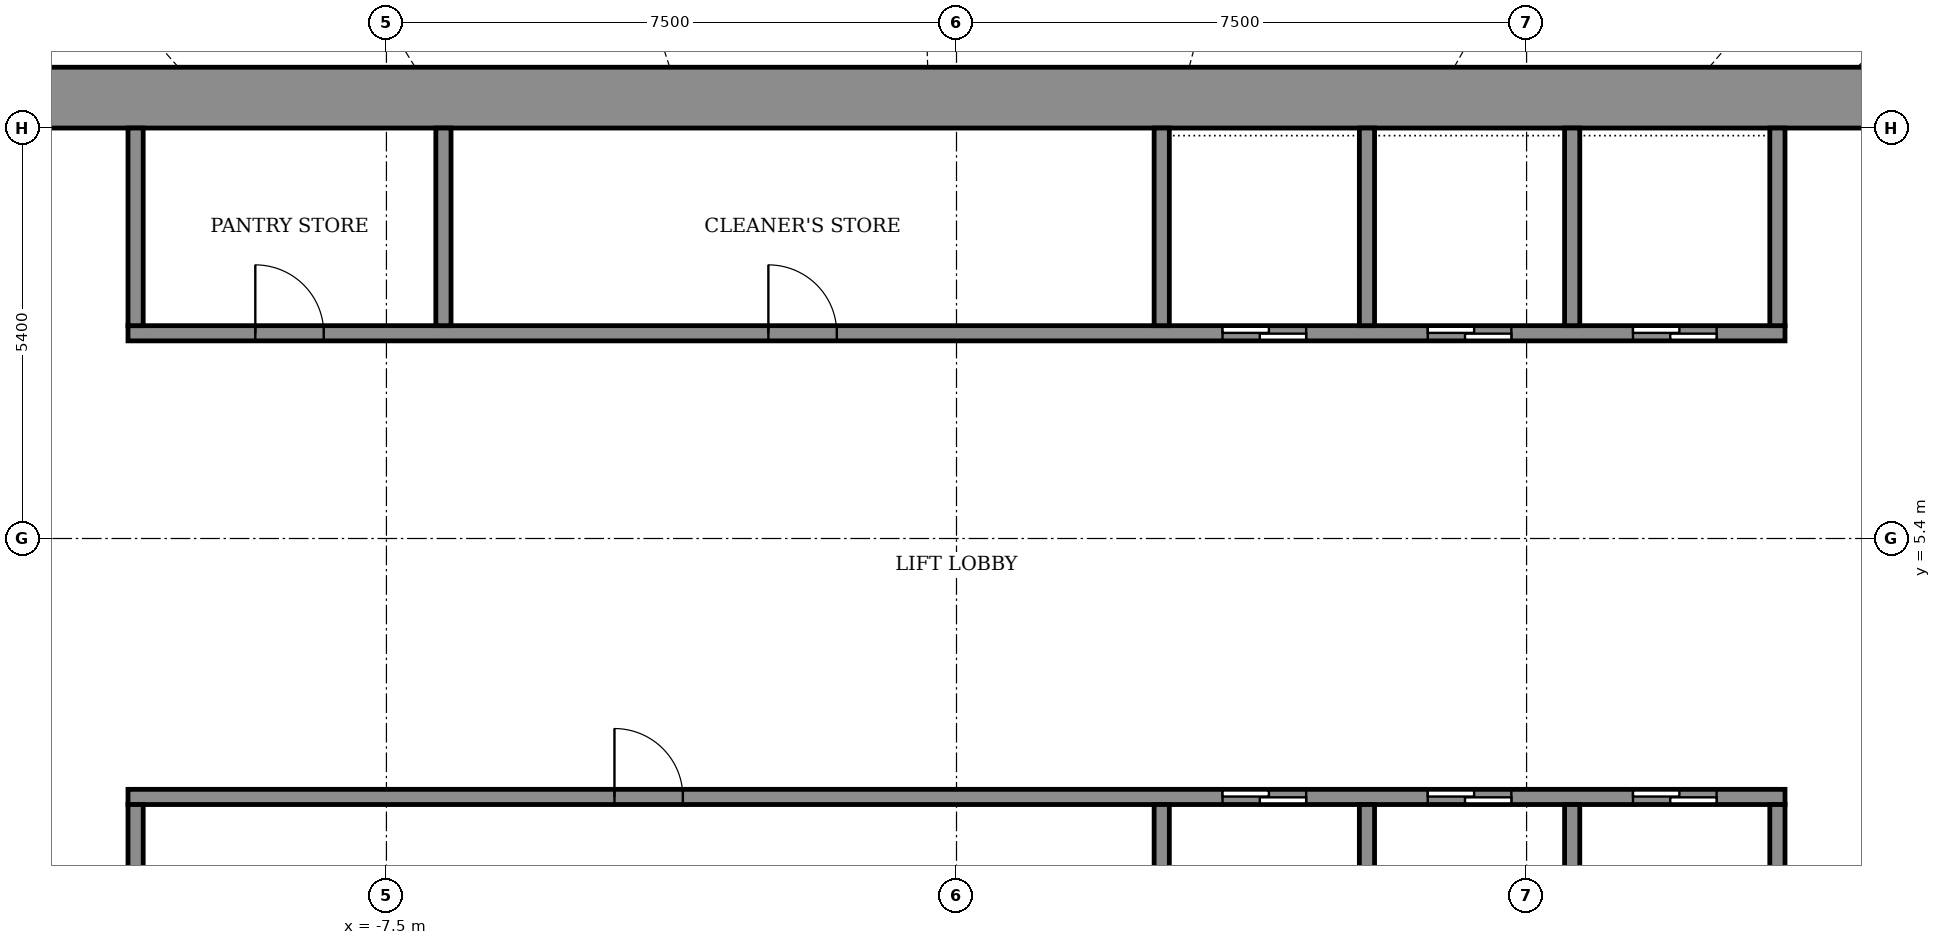
"""IFC4 building model, lengths in metres.
Left out: names, types, materials, properties, quantities, classifications, styles, units other than length and angle.
Written with IfcOpenShell. Run it as: python <this file> out.ifc"""

import sys

from ifc_helpers import new_model, si_unit, direction, frame, frame_2d, origin, place, context, subcontext, project, spatial, rectangle, extrude, element, fill, save


model = new_model("IFC4")
c1 = context("Model", 3, precision=1e-05, world=origin(), true_north=direction((0.0, 1.0)))
c2 = subcontext(c1, "Body", "Model", "MODEL_VIEW")
j1 = project(units=[si_unit("LENGTHUNIT", "METRE"), si_unit("PLANEANGLEUNIT", "RADIAN")], contexts=[c1])
p1 = place(None, origin())
s1 = spatial("IfcSite", under=j1, at=p1, CompositionType="ELEMENT")
p2 = place(p1, origin())
s2 = spatial("IfcBuilding", under=s1, at=p2, CompositionType="ELEMENT")
p3 = place(p2, frame((0.0, 0.0, 193.3)))
s3 = spatial("IfcBuildingStorey", under=s2, at=p3, CompositionType="ELEMENT", Elevation=193.3)
p4 = place(p3, frame((-14.6, 11.2, 0.0), z_axis=(0.0, 0.0, 1.0), x_axis=(1.0, 0.0, 0.0)))
e1 = element("IfcWall", 1, at=p4, inside=s3, PredefinedType="SHEAR", context=c2, shape_type="SweptSolid", body=[
    extrude(rectangle(XDim=29.2, YDim=0.8, at=frame_2d((14.6, 0.0))), origin(), (0.0, 0.0, 1.0), 4.6),
])
p5 = place(p3, frame((-10.9, 2.0, 0.0), z_axis=(0.0, 0.0, 1.0), x_axis=(1.0, 0.0, 0.0)))
e2 = element("IfcWall", 2, at=p5, inside=s3, PredefinedType="SHEAR", context=c2, shape_type="SweptSolid", body=[
    extrude(rectangle(XDim=21.8, YDim=0.2, at=frame_2d((10.9, 0.0))), origin(), (0.0, 0.0, 1.0), 4.05),
])
p6 = place(p5, frame((14.4, 0.0, 0.0)))
e3 = element("IfcOpeningElement", 3, at=p6, cuts=e2, PredefinedType="OPENING", context=c2, shape_type="SweptSolid", body=[
    extrude(rectangle(XDim=1.1, YDim=2.1, at=frame_2d((0.55, 1.05))), frame((0.0, 0.11, 0.0), z_axis=(0.0, -1.0, 0.0), x_axis=(1.0, 0.0, 0.0)), (0.0, 0.0, 1.0), 0.22),
])
p7 = place(p5, frame((17.1, 0.0, 0.0)))
e4 = element("IfcOpeningElement", 4, at=p7, cuts=e2, PredefinedType="OPENING", context=c2, shape_type="SweptSolid", body=[
    extrude(rectangle(XDim=1.1, YDim=2.1, at=frame_2d((0.55, 1.05))), frame((0.0, 0.11, 0.0), z_axis=(0.0, -1.0, 0.0), x_axis=(1.0, 0.0, 0.0)), (0.0, 0.0, 1.0), 0.22),
])
p8 = place(p5, frame((19.8, 0.0, 0.0)))
e5 = element("IfcOpeningElement", 5, at=p8, cuts=e2, PredefinedType="OPENING", context=c2, shape_type="SweptSolid", body=[
    extrude(rectangle(XDim=1.1, YDim=2.1, at=frame_2d((0.55, 1.05))), frame((0.0, 0.11, 0.0), z_axis=(0.0, -1.0, 0.0), x_axis=(1.0, 0.0, 0.0)), (0.0, 0.0, 1.0), 0.22),
])
p9 = place(p5, frame((6.4, 0.0, 0.0)))
e6 = element("IfcOpeningElement", 6, at=p9, cuts=e2, PredefinedType="OPENING", context=c2, shape_type="SweptSolid", body=[
    extrude(rectangle(XDim=0.9, YDim=2.1, at=frame_2d((0.45, 1.05))), frame((0.0, 0.11, 0.0), z_axis=(0.0, -1.0, 0.0), x_axis=(1.0, 0.0, 0.0)), (0.0, 0.0, 1.0), 0.22),
])
p10 = place(p3, frame((-10.9, 8.1, 0.0), z_axis=(0.0, 0.0, 1.0), x_axis=(1.0, 0.0, 0.0)))
e7 = element("IfcWall", 7, at=p10, inside=s3, PredefinedType="SHEAR", context=c2, shape_type="SweptSolid", body=[
    extrude(rectangle(XDim=21.8, YDim=0.2, at=frame_2d((10.9, 0.0))), origin(), (0.0, 0.0, 1.0), 4.05),
])
p11 = place(p10, frame((14.4, 0.0, 0.0)))
e8 = element("IfcOpeningElement", 8, at=p11, cuts=e7, PredefinedType="OPENING", context=c2, shape_type="SweptSolid", body=[
    extrude(rectangle(XDim=1.1, YDim=2.1, at=frame_2d((0.55, 1.05))), frame((0.0, 0.11, 0.0), z_axis=(0.0, -1.0, 0.0), x_axis=(1.0, 0.0, 0.0)), (0.0, 0.0, 1.0), 0.22),
])
p12 = place(p10, frame((17.1, 0.0, 0.0)))
e9 = element("IfcOpeningElement", 9, at=p12, cuts=e7, PredefinedType="OPENING", context=c2, shape_type="SweptSolid", body=[
    extrude(rectangle(XDim=1.1, YDim=2.1, at=frame_2d((0.55, 1.05))), frame((0.0, 0.11, 0.0), z_axis=(0.0, -1.0, 0.0), x_axis=(1.0, 0.0, 0.0)), (0.0, 0.0, 1.0), 0.22),
])
p13 = place(p10, frame((19.8, 0.0, 0.0)))
e10 = element("IfcOpeningElement", 10, at=p13, cuts=e7, PredefinedType="OPENING", context=c2, shape_type="SweptSolid", body=[
    extrude(rectangle(XDim=1.1, YDim=2.1, at=frame_2d((0.55, 1.05))), frame((0.0, 0.11, 0.0), z_axis=(0.0, -1.0, 0.0), x_axis=(1.0, 0.0, 0.0)), (0.0, 0.0, 1.0), 0.22),
])
p14 = place(p10, frame((1.675, 0.0, 0.0)))
e11 = element("IfcOpeningElement", 11, at=p14, cuts=e7, PredefinedType="OPENING", context=c2, shape_type="SweptSolid", body=[
    extrude(rectangle(XDim=0.9, YDim=2.1, at=frame_2d((0.45, 1.05))), frame((0.0, 0.11, 0.0), z_axis=(0.0, -1.0, 0.0), x_axis=(1.0, 0.0, 0.0)), (0.0, 0.0, 1.0), 0.22),
])
p15 = place(p10, frame((8.425, 0.0, 0.0)))
e12 = element("IfcOpeningElement", 12, at=p15, cuts=e7, PredefinedType="OPENING", context=c2, shape_type="SweptSolid", body=[
    extrude(rectangle(XDim=0.9, YDim=2.1, at=frame_2d((0.45, 1.05))), frame((0.0, 0.11, 0.0), z_axis=(0.0, -1.0, 0.0), x_axis=(1.0, 0.0, 0.0)), (0.0, 0.0, 1.0), 0.22),
])
p16 = place(p3, frame((-10.8, -0.6, 0.0), z_axis=(0.0, 0.0, 1.0), x_axis=(0.0, 1.0, 0.0)))
e13 = element("IfcWall", 13, at=p16, inside=s3, PredefinedType="STANDARD", context=c2, shape_type="SweptSolid", body=[
    extrude(rectangle(XDim=2.5, YDim=0.2, at=frame_2d((1.25, 0.0))), origin(), (0.0, 0.0, 1.0), 4.05),
])
for number, where, z_axis, x_axis in (
    (14, (2.7, -0.6, 0.0), (0.0, 0.0, 1.0), (0.0, 1.0, 0.0)),
    (15, (5.4, -0.6, 0.0), (0.0, 0.0, 1.0), (0.0, 1.0, 0.0)),
    (16, (8.1, -0.6, 0.0), (0.0, 0.0, 1.0), (0.0, 1.0, 0.0)),
    (17, (10.8, -0.6, 0.0), (0.0, 0.0, 1.0), (0.0, 1.0, 0.0)),
):
    element("IfcWall", number, at=place(p3, frame(where, z_axis=z_axis, x_axis=x_axis)), inside=s3, PredefinedType="SHEAR", context=c2, shape_type="SweptSolid", body=[
        extrude(rectangle(XDim=2.5, YDim=0.2, at=frame_2d((1.25, 0.0))), origin(), (0.0, 0.0, 1.0), 4.05),
    ])
for number, where, z_axis, x_axis in (
    (18, (-10.8, 8.2, 0.0), (0.0, 0.0, 1.0), (0.0, 1.0, 0.0)),
    (19, (-6.75, 8.2, 0.0), (0.0, 0.0, 1.0), (0.0, 1.0, 0.0)),
):
    element("IfcWall", number, at=place(p3, frame(where, z_axis=z_axis, x_axis=x_axis)), inside=s3, PredefinedType="STANDARD", context=c2, shape_type="SweptSolid", body=[
        extrude(rectangle(XDim=2.6, YDim=0.2, at=frame_2d((1.3, 0.0))), origin(), (0.0, 0.0, 1.0), 4.05),
    ])
for number, where, z_axis, x_axis in (
    (20, (2.7, 8.2, 0.0), (0.0, 0.0, 1.0), (0.0, 1.0, 0.0)),
    (21, (5.4, 8.2, 0.0), (0.0, 0.0, 1.0), (0.0, 1.0, 0.0)),
    (22, (8.1, 8.2, 0.0), (0.0, 0.0, 1.0), (0.0, 1.0, 0.0)),
    (23, (10.8, 8.2, 0.0), (0.0, 0.0, 1.0), (0.0, 1.0, 0.0)),
):
    element("IfcWall", number, at=place(p3, frame(where, z_axis=z_axis, x_axis=x_axis)), inside=s3, PredefinedType="SHEAR", context=c2, shape_type="SweptSolid", body=[
        extrude(rectangle(XDim=2.6, YDim=0.2, at=frame_2d((1.3, 0.0))), origin(), (0.0, 0.0, 1.0), 4.05),
    ])
p17 = place(p6, origin())
e24 = element("IfcDoor", 24, at=p17, inside=s3, OperationType="SLIDING_TO_LEFT", PredefinedType="DOOR", context=c2, shape_type="SweptSolid", body=[
    extrude(rectangle(XDim=1.1, YDim=2.1, at=frame_2d((0.55, 1.05))), frame((0.0, 0.025, 0.0), z_axis=(0.0, -1.0, 0.0), x_axis=(1.0, 0.0, 0.0)), (0.0, 0.0, 1.0), 0.05),
])
fill(e3, e24)
p18 = place(p7, origin())
e25 = element("IfcDoor", 25, at=p18, inside=s3, OperationType="SLIDING_TO_LEFT", PredefinedType="DOOR", context=c2, shape_type="SweptSolid", body=[
    extrude(rectangle(XDim=1.1, YDim=2.1, at=frame_2d((0.55, 1.05))), frame((0.0, 0.025, 0.0), z_axis=(0.0, -1.0, 0.0), x_axis=(1.0, 0.0, 0.0)), (0.0, 0.0, 1.0), 0.05),
])
fill(e4, e25)
p19 = place(p8, origin())
e26 = element("IfcDoor", 26, at=p19, inside=s3, OperationType="SLIDING_TO_LEFT", PredefinedType="DOOR", context=c2, shape_type="SweptSolid", body=[
    extrude(rectangle(XDim=1.1, YDim=2.1, at=frame_2d((0.55, 1.05))), frame((0.0, 0.025, 0.0), z_axis=(0.0, -1.0, 0.0), x_axis=(1.0, 0.0, 0.0)), (0.0, 0.0, 1.0), 0.05),
])
fill(e5, e26)
p20 = place(p11, origin())
e27 = element("IfcDoor", 27, at=p20, inside=s3, OperationType="SLIDING_TO_LEFT", PredefinedType="DOOR", context=c2, shape_type="SweptSolid", body=[
    extrude(rectangle(XDim=1.1, YDim=2.1, at=frame_2d((0.55, 1.05))), frame((0.0, 0.025, 0.0), z_axis=(0.0, -1.0, 0.0), x_axis=(1.0, 0.0, 0.0)), (0.0, 0.0, 1.0), 0.05),
])
fill(e8, e27)
p21 = place(p12, origin())
e28 = element("IfcDoor", 28, at=p21, inside=s3, OperationType="SLIDING_TO_LEFT", PredefinedType="DOOR", context=c2, shape_type="SweptSolid", body=[
    extrude(rectangle(XDim=1.1, YDim=2.1, at=frame_2d((0.55, 1.05))), frame((0.0, 0.025, 0.0), z_axis=(0.0, -1.0, 0.0), x_axis=(1.0, 0.0, 0.0)), (0.0, 0.0, 1.0), 0.05),
])
fill(e9, e28)
p22 = place(p13, origin())
e29 = element("IfcDoor", 29, at=p22, inside=s3, OperationType="SLIDING_TO_LEFT", PredefinedType="DOOR", context=c2, shape_type="SweptSolid", body=[
    extrude(rectangle(XDim=1.1, YDim=2.1, at=frame_2d((0.55, 1.05))), frame((0.0, 0.025, 0.0), z_axis=(0.0, -1.0, 0.0), x_axis=(1.0, 0.0, 0.0)), (0.0, 0.0, 1.0), 0.05),
])
fill(e10, e29)
p23 = place(p9, origin())
e30 = element("IfcDoor", 30, at=p23, inside=s3, OperationType="SINGLE_SWING_RIGHT", PredefinedType="DOOR", context=c2, shape_type="SweptSolid", body=[
    extrude(rectangle(XDim=0.9, YDim=2.1, at=frame_2d((0.45, 1.05))), frame((0.0, 0.025, 0.0), z_axis=(0.0, -1.0, 0.0), x_axis=(1.0, 0.0, 0.0)), (0.0, 0.0, 1.0), 0.05),
])
fill(e6, e30)
p24 = place(p14, origin())
e31 = element("IfcDoor", 31, at=p24, inside=s3, OperationType="SINGLE_SWING_RIGHT", PredefinedType="DOOR", context=c2, shape_type="SweptSolid", body=[
    extrude(rectangle(XDim=0.9, YDim=2.1, at=frame_2d((0.45, 1.05))), frame((0.0, 0.025, 0.0), z_axis=(0.0, -1.0, 0.0), x_axis=(1.0, 0.0, 0.0)), (0.0, 0.0, 1.0), 0.05),
])
fill(e11, e31)
p25 = place(p15, origin())
e32 = element("IfcDoor", 32, at=p25, inside=s3, OperationType="SINGLE_SWING_RIGHT", PredefinedType="DOOR", context=c2, shape_type="SweptSolid", body=[
    extrude(rectangle(XDim=0.9, YDim=2.1, at=frame_2d((0.45, 1.05))), frame((0.0, 0.025, 0.0), z_axis=(0.0, -1.0, 0.0), x_axis=(1.0, 0.0, 0.0)), (0.0, 0.0, 1.0), 0.05),
])
fill(e12, e32)
save(model, sys.argv[1])
